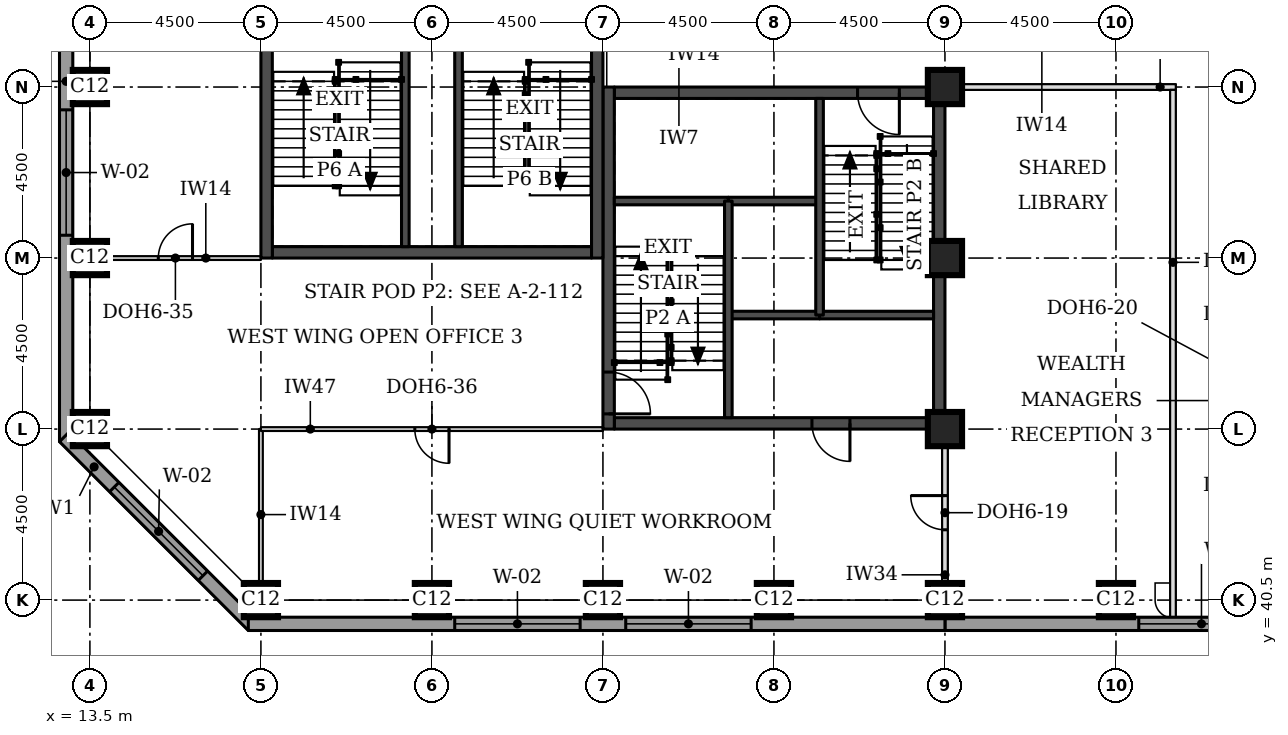
"""IFC4 building model, lengths in metres.
Left out: names, types, materials, properties, quantities, classifications, styles, units other than length and angle.
Written with IfcOpenShell. Run it as: python <this file> out.ifc"""

import sys

from ifc_helpers import new_model, si_unit, direction, frame, frame_2d, origin, origin_2d, place, context, subcontext, project, spatial, rectangle, extrude, element, fill, save


model = new_model("IFC4")
c1 = context("Model", 3, precision=1e-05, world=origin(), true_north=direction((0.0, 1.0)))
c2 = subcontext(c1, "Body", "Model", "MODEL_VIEW")
j1 = project(units=[si_unit("LENGTHUNIT", "METRE"), si_unit("PLANEANGLEUNIT", "RADIAN")], contexts=[c1])
p1 = place(None, origin())
s1 = spatial("IfcSite", under=j1, at=p1, CompositionType="ELEMENT")
p2 = place(p1, origin())
s2 = spatial("IfcBuilding", under=s1, at=p2, CompositionType="ELEMENT")
p3 = place(p2, frame((0.0, 0.0, 188.4)))
s3 = spatial("IfcBuildingStorey", under=s2, at=p3, CompositionType="ELEMENT", Elevation=188.4)
for number, where, z_axis, x_axis in (
    (1, (18.0, 40.5, 0.0), (0.0, 0.0, 1.0), (1.0, 0.0, 0.0)),
    (2, (22.5, 40.5, 0.0), (0.0, 0.0, 1.0), (1.0, 0.0, 0.0)),
    (3, (27.0, 40.5, 0.0), (0.0, 0.0, 1.0), (1.0, 0.0, 0.0)),
    (4, (31.5, 40.5, 0.0), (0.0, 0.0, 1.0), (1.0, 0.0, 0.0)),
    (5, (36.0, 40.5, 0.0), (0.0, 0.0, 1.0), (1.0, 0.0, 0.0)),
    (6, (40.5, 40.5, 0.0), (0.0, 0.0, 1.0), (1.0, 0.0, 0.0)),
    (7, (13.5, 45.0, 0.0), (0.0, 0.0, 1.0), (1.0, 0.0, 0.0)),
    (8, (36.0, 45.0, 0.0), (0.0, 0.0, 1.0), (1.0, 0.0, 0.0)),
    (9, (13.5, 49.5, 0.0), (0.0, 0.0, 1.0), (1.0, 0.0, 0.0)),
    (10, (36.0, 49.5, 0.0), (0.0, 0.0, 1.0), (1.0, 0.0, 0.0)),
    (11, (13.5, 54.0, 0.0), (0.0, 0.0, 1.0), (1.0, 0.0, 0.0)),
    (12, (36.0, 54.0, 0.0), (0.0, 0.0, 1.0), (1.0, 0.0, 0.0)),
):
    element("IfcColumn", number, at=place(p3, frame(where, z_axis=z_axis, x_axis=x_axis)), inside=s3, PredefinedType="COLUMN", context=c2, shape_type="SweptSolid", body=[
        extrude(rectangle(XDim=0.9, YDim=0.9, at=origin_2d()), origin(), (0.0, 0.0, 1.0), 3.7),
    ])
p4 = place(p3, frame((27.3, 45.15, 0.0), z_axis=(0.0, 0.0, 1.0), x_axis=(1.0, 0.0, 0.0)))
e13 = element("IfcWall", 13, at=p4, inside=s3, PredefinedType="SHEAR", context=c2, shape_type="SweptSolid", body=[
    extrude(rectangle(XDim=8.4, YDim=0.3, at=frame_2d((4.2, 0.0))), origin(), (0.0, 0.0, 1.0), 3.7),
])
p5 = place(p4, frame((5.2, 0.0, 0.0)))
e14 = element("IfcOpeningElement", 14, at=p5, cuts=e13, PredefinedType="OPENING", context=c2, shape_type="SweptSolid", body=[
    extrude(rectangle(XDim=1.0, YDim=2.1, at=frame_2d((0.5, 1.05))), frame((0.0, 0.16, 0.0), z_axis=(0.0, -1.0, 0.0), x_axis=(1.0, 0.0, 0.0)), (0.0, 0.0, 1.0), 0.32),
])
p6 = place(p3, frame((27.3, 53.85, 0.0), z_axis=(0.0, 0.0, 1.0), x_axis=(1.0, 0.0, 0.0)))
e15 = element("IfcWall", 15, at=p6, inside=s3, PredefinedType="SHEAR", context=c2, shape_type="SweptSolid", body=[
    extrude(rectangle(XDim=8.4, YDim=0.3, at=frame_2d((4.2, 0.0))), origin(), (0.0, 0.0, 1.0), 3.7),
])
p7 = place(p6, frame((6.4, 0.0, 0.0)))
e16 = element("IfcOpeningElement", 16, at=p7, cuts=e15, PredefinedType="OPENING", context=c2, shape_type="SweptSolid", body=[
    extrude(rectangle(XDim=1.1, YDim=2.1, at=frame_2d((0.55, 1.05))), frame((0.0, 0.16, 0.0), z_axis=(0.0, -1.0, 0.0), x_axis=(1.0, 0.0, 0.0)), (0.0, 0.0, 1.0), 0.32),
])
p8 = place(p3, frame((27.15, 45.0, 0.0), z_axis=(0.0, 0.0, 1.0), x_axis=(0.0, 1.0, 0.0)))
e17 = element("IfcWall", 17, at=p8, inside=s3, PredefinedType="SHEAR", context=c2, shape_type="SweptSolid", body=[
    extrude(rectangle(XDim=9.0, YDim=0.3, at=frame_2d((4.5, 0.0))), origin(), (0.0, 0.0, 1.0), 3.7),
])
p9 = place(p8, frame((0.4, 0.0, 0.0)))
e18 = element("IfcOpeningElement", 18, at=p9, cuts=e17, PredefinedType="OPENING", context=c2, shape_type="SweptSolid", body=[
    extrude(rectangle(XDim=1.1, YDim=2.1, at=frame_2d((0.55, 1.05))), frame((0.0, 0.16, 0.0), z_axis=(0.0, -1.0, 0.0), x_axis=(1.0, 0.0, 0.0)), (0.0, 0.0, 1.0), 0.32),
])
p10 = place(p3, frame((35.85, 45.0, 0.0), z_axis=(0.0, 0.0, 1.0), x_axis=(0.0, 1.0, 0.0)))
e19 = element("IfcWall", 19, at=p10, inside=s3, PredefinedType="SHEAR", context=c2, shape_type="SweptSolid", body=[
    extrude(rectangle(XDim=9.0, YDim=0.3, at=frame_2d((4.5, 0.0))), origin(), (0.0, 0.0, 1.0), 3.7),
])
p11 = place(p3, frame((18.3, 49.65, 0.0), z_axis=(0.0, 0.0, 1.0), x_axis=(1.0, 0.0, 0.0)))
e20 = element("IfcWall", 20, at=p11, inside=s3, PredefinedType="SHEAR", context=c2, shape_type="SweptSolid", body=[
    extrude(rectangle(XDim=8.4, YDim=0.3, at=frame_2d((4.2, 0.0))), origin(), (0.0, 0.0, 1.0), 3.7),
])
p12 = place(p3, frame((18.15, 49.5, 0.0), z_axis=(0.0, 0.0, 1.0), x_axis=(0.0, 1.0, 0.0)))
e21 = element("IfcWall", 21, at=p12, inside=s3, PredefinedType="SHEAR", context=c2, shape_type="SweptSolid", body=[
    extrude(rectangle(XDim=9.0, YDim=0.3, at=frame_2d((4.5, 0.0))), origin(), (0.0, 0.0, 1.0), 3.7),
])
p13 = place(p3, frame((26.85, 49.5, 0.0), z_axis=(0.0, 0.0, 1.0), x_axis=(0.0, 1.0, 0.0)))
e22 = element("IfcWall", 22, at=p13, inside=s3, PredefinedType="SHEAR", context=c2, shape_type="SweptSolid", body=[
    extrude(rectangle(XDim=9.0, YDim=0.3, at=frame_2d((4.5, 0.0))), origin(), (0.0, 0.0, 1.0), 3.7),
])
p14 = place(p13, frame((6.6, 0.0, 0.0)))
e23 = element("IfcOpeningElement", 23, at=p14, cuts=e22, PredefinedType="OPENING", context=c2, shape_type="SweptSolid", body=[
    extrude(rectangle(XDim=1.8, YDim=2.1, at=frame_2d((0.9, 1.05))), frame((0.0, 0.16, 0.0), z_axis=(0.0, -1.0, 0.0), x_axis=(1.0, 0.0, 0.0)), (0.0, 0.0, 1.0), 0.32),
])
p15 = place(p3, frame((36.0, 39.875, 0.0), z_axis=(0.0, 0.0, 1.0), x_axis=(1.0, 0.0, 0.0)))
e24 = element("IfcWall", 24, at=p15, inside=s3, PredefinedType="STANDARD", context=c2, shape_type="SweptSolid", body=[
    extrude(rectangle(XDim=36.331, YDim=0.35, at=frame_2d((18.166, 0.0))), origin(), (0.0, 0.0, 1.0), 3.525),
])
p16 = place(p15, frame((5.1, 0.0, 0.9)))
e25 = element("IfcOpeningElement", 25, at=p16, cuts=e24, PredefinedType="OPENING", context=c2, shape_type="SweptSolid", body=[
    extrude(rectangle(XDim=3.3, YDim=1.9, at=frame_2d((1.65, 0.95))), frame((0.0, 0.185, 0.0), z_axis=(0.0, -1.0, 0.0), x_axis=(1.0, 0.0, 0.0)), (0.0, 0.0, 1.0), 0.37),
])
p17 = place(p15, frame((9.6, 0.0, 0.9)))
e26 = element("IfcOpeningElement", 26, at=p17, cuts=e24, PredefinedType="OPENING", context=c2, shape_type="SweptSolid", body=[
    extrude(rectangle(XDim=3.3, YDim=1.9, at=frame_2d((1.65, 0.95))), frame((0.0, 0.185, 0.0), z_axis=(0.0, -1.0, 0.0), x_axis=(1.0, 0.0, 0.0)), (0.0, 0.0, 1.0), 0.37),
])
p18 = place(p15, frame((14.1, 0.0, 0.9)))
e27 = element("IfcOpeningElement", 27, at=p18, cuts=e24, PredefinedType="OPENING", context=c2, shape_type="SweptSolid", body=[
    extrude(rectangle(XDim=3.3, YDim=1.9, at=frame_2d((1.65, 0.95))), frame((0.0, 0.185, 0.0), z_axis=(0.0, -1.0, 0.0), x_axis=(1.0, 0.0, 0.0)), (0.0, 0.0, 1.0), 0.37),
])
p19 = place(p15, frame((18.6, 0.0, 0.9)))
e28 = element("IfcOpeningElement", 28, at=p19, cuts=e24, PredefinedType="OPENING", context=c2, shape_type="SweptSolid", body=[
    extrude(rectangle(XDim=3.3, YDim=1.9, at=frame_2d((1.65, 0.95))), frame((0.0, 0.185, 0.0), z_axis=(0.0, -1.0, 0.0), x_axis=(1.0, 0.0, 0.0)), (0.0, 0.0, 1.0), 0.37),
])
p20 = place(p15, frame((23.1, 0.0, 0.9)))
e29 = element("IfcOpeningElement", 29, at=p20, cuts=e24, PredefinedType="OPENING", context=c2, shape_type="SweptSolid", body=[
    extrude(rectangle(XDim=3.3, YDim=1.9, at=frame_2d((1.65, 0.95))), frame((0.0, 0.185, 0.0), z_axis=(0.0, -1.0, 0.0), x_axis=(1.0, 0.0, 0.0)), (0.0, 0.0, 1.0), 0.37),
])
p21 = place(p15, frame((27.6, 0.0, 0.9)))
e30 = element("IfcOpeningElement", 30, at=p21, cuts=e24, PredefinedType="OPENING", context=c2, shape_type="SweptSolid", body=[
    extrude(rectangle(XDim=3.3, YDim=1.9, at=frame_2d((1.65, 0.95))), frame((0.0, 0.185, 0.0), z_axis=(0.0, -1.0, 0.0), x_axis=(1.0, 0.0, 0.0)), (0.0, 0.0, 1.0), 0.37),
])
p22 = place(p3, frame((12.875, 58.831, 0.0), z_axis=(0.0, 0.0, 1.0), x_axis=(0.0, -1.0, 0.0)))
e31 = element("IfcWall", 31, at=p22, inside=s3, PredefinedType="STANDARD", context=c2, shape_type="SweptSolid", body=[
    extrude(rectangle(XDim=14.163, YDim=0.35, at=frame_2d((7.081, 0.0))), origin(), (0.0, 0.0, 1.0), 3.525),
])
p23 = place(p22, frame((5.431, 0.0, 0.9)))
e32 = element("IfcOpeningElement", 32, at=p23, cuts=e31, PredefinedType="OPENING", context=c2, shape_type="SweptSolid", body=[
    extrude(rectangle(XDim=3.3, YDim=1.9, at=frame_2d((1.65, 0.95))), frame((0.0, 0.185, 0.0), z_axis=(0.0, -1.0, 0.0), x_axis=(1.0, 0.0, 0.0)), (0.0, 0.0, 1.0), 0.37),
])
p24 = place(p3, frame((12.824, 44.792, 0.0), z_axis=(0.0, 0.0, 1.0), x_axis=(0.707106781187, -0.707106781187, 0.0)))
e33 = element("IfcWall", 33, at=p24, inside=s3, PredefinedType="STANDARD", context=c2, shape_type="SweptSolid", body=[
    extrude(rectangle(XDim=7.027, YDim=0.35, at=frame_2d((3.513, 0.0))), origin(), (0.0, 0.0, 1.0), 3.525),
])
p25 = place(p24, frame((1.863, 0.0, 0.9)))
e34 = element("IfcOpeningElement", 34, at=p25, cuts=e33, PredefinedType="OPENING", context=c2, shape_type="SweptSolid", body=[
    extrude(rectangle(XDim=3.3, YDim=1.9, at=frame_2d((1.65, 0.95))), frame((0.0, 0.185, 0.0), z_axis=(0.0, -1.0, 0.0), x_axis=(1.0, 0.0, 0.0)), (0.0, 0.0, 1.0), 0.37),
])
p26 = place(p3, frame((17.669, 39.875, 0.0), z_axis=(0.0, 0.0, 1.0), x_axis=(1.0, 0.0, 0.0)))
e35 = element("IfcWall", 35, at=p26, inside=s3, PredefinedType="STANDARD", context=c2, shape_type="SweptSolid", body=[
    extrude(rectangle(XDim=18.331, YDim=0.35, at=frame_2d((9.166, 0.0))), origin(), (0.0, 0.0, 1.0), 3.525),
])
p27 = place(p26, frame((5.431, 0.0, 0.9)))
e36 = element("IfcOpeningElement", 36, at=p27, cuts=e35, PredefinedType="OPENING", context=c2, shape_type="SweptSolid", body=[
    extrude(rectangle(XDim=3.3, YDim=1.9, at=frame_2d((1.65, 0.95))), frame((0.0, 0.185, 0.0), z_axis=(0.0, -1.0, 0.0), x_axis=(1.0, 0.0, 0.0)), (0.0, 0.0, 1.0), 0.37),
])
p28 = place(p26, frame((9.931, 0.0, 0.9)))
e37 = element("IfcOpeningElement", 37, at=p28, cuts=e35, PredefinedType="OPENING", context=c2, shape_type="SweptSolid", body=[
    extrude(rectangle(XDim=3.3, YDim=1.9, at=frame_2d((1.65, 0.95))), frame((0.0, 0.185, 0.0), z_axis=(0.0, -1.0, 0.0), x_axis=(1.0, 0.0, 0.0)), (0.0, 0.0, 1.0), 0.37),
])
p29 = place(p3, frame((36.45, 54.0, 0.0), z_axis=(0.0, 0.0, 1.0), x_axis=(1.0, 0.0, 0.0)))
e38 = element("IfcWall", 38, at=p29, inside=s3, PredefinedType="PARTITIONING", context=c2, shape_type="SweptSolid", body=[
    extrude(rectangle(XDim=5.625, YDim=0.15, at=frame_2d((2.812, 0.0))), origin(), (0.0, 0.0, 1.0), 3.55),
])
p30 = place(p3, frame((42.0, 40.05, 0.0), z_axis=(0.0, 0.0, 1.0), x_axis=(0.0, 1.0, 0.0)))
e39 = element("IfcWall", 39, at=p30, inside=s3, PredefinedType="PARTITIONING", context=c2, shape_type="SweptSolid", body=[
    extrude(rectangle(XDim=13.875, YDim=0.15, at=frame_2d((6.938, 0.0))), origin(), (0.0, 0.0, 1.0), 3.55),
])
p31 = place(p3, frame((36.0, 40.95, 0.0), z_axis=(0.0, 0.0, 1.0), x_axis=(0.0, 1.0, 0.0)))
e40 = element("IfcWall", 40, at=p31, inside=s3, PredefinedType="PARTITIONING", context=c2, shape_type="SweptSolid", body=[
    extrude(rectangle(XDim=3.63, YDim=0.15, at=frame_2d((1.815, 0.0))), origin(), (0.0, 0.0, 1.0), 2.8),
])
p32 = place(p31, frame((1.4, 0.0, 0.0)))
e41 = element("IfcOpeningElement", 41, at=p32, cuts=e40, PredefinedType="OPENING", context=c2, shape_type="SweptSolid", body=[
    extrude(rectangle(XDim=0.9, YDim=2.1, at=frame_2d((0.45, 1.05))), frame((0.0, 0.085, 0.0), z_axis=(0.0, -1.0, 0.0), x_axis=(1.0, 0.0, 0.0)), (0.0, 0.0, 1.0), 0.17),
])
p33 = place(p3, frame((13.5, 49.5, 0.0), z_axis=(0.0, 0.0, 1.0), x_axis=(1.0, 0.0, 0.0)))
e42 = element("IfcWall", 42, at=p33, inside=s3, PredefinedType="PARTITIONING", context=c2, shape_type="SweptSolid", body=[
    extrude(rectangle(XDim=4.5, YDim=0.1, at=frame_2d((2.25, 0.0))), origin(), (0.0, 0.0, 1.0), 3.55),
])
p34 = place(p33, frame((1.8, 0.0, 0.0)))
e43 = element("IfcOpeningElement", 43, at=p34, cuts=e42, PredefinedType="OPENING", context=c2, shape_type="SweptSolid", body=[
    extrude(rectangle(XDim=0.9, YDim=2.1, at=frame_2d((0.45, 1.05))), frame((0.0, 0.06, 0.0), z_axis=(0.0, -1.0, 0.0), x_axis=(1.0, 0.0, 0.0)), (0.0, 0.0, 1.0), 0.12),
])
p35 = place(p3, frame((18.0, 40.5, 0.0), z_axis=(0.0, 0.0, 1.0), x_axis=(0.0, 1.0, 0.0)))
e44 = element("IfcWall", 44, at=p35, inside=s3, PredefinedType="PARTITIONING", context=c2, shape_type="SweptSolid", body=[
    extrude(rectangle(XDim=4.5, YDim=0.1, at=frame_2d((2.25, 0.0))), origin(), (0.0, 0.0, 1.0), 3.55),
])
p36 = place(p3, frame((18.0, 45.0, 0.0), z_axis=(0.0, 0.0, 1.0), x_axis=(1.0, 0.0, 0.0)))
e45 = element("IfcWall", 45, at=p36, inside=s3, PredefinedType="PARTITIONING", context=c2, shape_type="SweptSolid", body=[
    extrude(rectangle(XDim=9.0, YDim=0.1, at=frame_2d((4.5, 0.0))), origin(), (0.0, 0.0, 1.0), 2.55),
])
p37 = place(p36, frame((4.05, 0.0, 0.0)))
e46 = element("IfcOpeningElement", 46, at=p37, cuts=e45, PredefinedType="OPENING", context=c2, shape_type="SweptSolid", body=[
    extrude(rectangle(XDim=0.9, YDim=2.1, at=frame_2d((0.45, 1.05))), frame((0.0, 0.06, 0.0), z_axis=(0.0, -1.0, 0.0), x_axis=(1.0, 0.0, 0.0)), (0.0, 0.0, 1.0), 0.12),
])
p38 = place(p3, frame((30.3, 48.0, 0.0), z_axis=(0.0, 0.0, 1.0), x_axis=(1.0, 0.0, 0.0)))
e47 = element("IfcWall", 47, at=p38, inside=s3, PredefinedType="SOLIDWALL", context=c2, shape_type="SweptSolid", body=[
    extrude(rectangle(XDim=2.4, YDim=0.2, at=frame_2d((1.2, 0.0))), origin(), (0.0, 0.0, 1.0), 3.55),
])
p39 = place(p3, frame((32.7, 48.0, 0.0), z_axis=(0.0, 0.0, 1.0), x_axis=(1.0, 0.0, 0.0)))
e48 = element("IfcWall", 48, at=p39, inside=s3, PredefinedType="SOLIDWALL", context=c2, shape_type="SweptSolid", body=[
    extrude(rectangle(XDim=3.0, YDim=0.2, at=frame_2d((1.5, 0.0))), origin(), (0.0, 0.0, 1.0), 3.55),
])
p40 = place(p3, frame((30.3, 51.0, 0.0), z_axis=(0.0, 0.0, 1.0), x_axis=(1.0, 0.0, 0.0)))
e49 = element("IfcWall", 49, at=p40, inside=s3, PredefinedType="SOLIDWALL", context=c2, shape_type="SweptSolid", body=[
    extrude(rectangle(XDim=2.4, YDim=0.2, at=frame_2d((1.2, 0.0))), origin(), (0.0, 0.0, 1.0), 3.7),
])
p41 = place(p3, frame((27.3, 51.0, 0.0), z_axis=(0.0, 0.0, 1.0), x_axis=(1.0, 0.0, 0.0)))
e50 = element("IfcWall", 50, at=p41, inside=s3, PredefinedType="SOLIDWALL", context=c2, shape_type="SweptSolid", body=[
    extrude(rectangle(XDim=3.0, YDim=0.2, at=frame_2d((1.5, 0.0))), origin(), (0.0, 0.0, 1.0), 3.55),
])
for number, where, z_axis, x_axis in (
    (51, (30.3, 45.3, 0.0), (0.0, 0.0, 1.0), (0.0, 1.0, 0.0)),
    (52, (32.7, 48.0, 0.0), (0.0, 0.0, 1.0), (0.0, 1.0, 0.0)),
):
    element("IfcWall", number, at=place(p3, frame(where, z_axis=z_axis, x_axis=x_axis)), inside=s3, PredefinedType="SOLIDWALL", context=c2, shape_type="SweptSolid", body=[
        extrude(rectangle(XDim=5.7, YDim=0.2, at=frame_2d((2.85, 0.0))), origin(), (0.0, 0.0, 1.0), 3.55),
    ])
for number, where, z_axis, x_axis in (
    (53, (21.8, 49.8, 0.0), (0.0, 0.0, 1.0), (0.0, 1.0, 0.0)),
    (54, (23.2, 49.8, 0.0), (0.0, 0.0, 1.0), (0.0, 1.0, 0.0)),
):
    element("IfcWall", number, at=place(p3, frame(where, z_axis=z_axis, x_axis=x_axis)), inside=s3, PredefinedType="SOLIDWALL", context=c2, shape_type="SweptSolid", body=[
        extrude(rectangle(XDim=6.05, YDim=0.2, at=frame_2d((3.025, 0.0))), origin(), (0.0, 0.0, 1.0), 3.55),
    ])
p42 = place(p16, origin())
e55 = element("IfcWindow", 55, at=p42, inside=s3, PartitioningType="SINGLE_PANEL", PredefinedType="WINDOW", context=c2, shape_type="SweptSolid", body=[
    extrude(rectangle(XDim=3.3, YDim=1.9, at=frame_2d((1.65, 0.95))), frame((0.0, 0.085, 0.0), z_axis=(0.0, -1.0, 0.0), x_axis=(1.0, 0.0, 0.0)), (0.0, 0.0, 1.0), 0.06),
])
fill(e25, e55)
p43 = place(p23, origin())
e56 = element("IfcWindow", 56, at=p43, inside=s3, PartitioningType="SINGLE_PANEL", PredefinedType="WINDOW", context=c2, shape_type="SweptSolid", body=[
    extrude(rectangle(XDim=3.3, YDim=1.9, at=frame_2d((1.65, 0.95))), frame((0.0, 0.085, 0.0), z_axis=(0.0, -1.0, 0.0), x_axis=(1.0, 0.0, 0.0)), (0.0, 0.0, 1.0), 0.06),
])
fill(e32, e56)
p44 = place(p25, origin())
e57 = element("IfcWindow", 57, at=p44, inside=s3, PartitioningType="SINGLE_PANEL", PredefinedType="WINDOW", context=c2, shape_type="SweptSolid", body=[
    extrude(rectangle(XDim=3.3, YDim=1.9, at=frame_2d((1.65, 0.95))), frame((0.0, 0.085, 0.0), z_axis=(0.0, -1.0, 0.0), x_axis=(1.0, 0.0, 0.0)), (0.0, 0.0, 1.0), 0.06),
])
fill(e34, e57)
p45 = place(p27, origin())
e58 = element("IfcWindow", 58, at=p45, inside=s3, PartitioningType="SINGLE_PANEL", PredefinedType="WINDOW", context=c2, shape_type="SweptSolid", body=[
    extrude(rectangle(XDim=3.3, YDim=1.9, at=frame_2d((1.65, 0.95))), frame((0.0, 0.085, 0.0), z_axis=(0.0, -1.0, 0.0), x_axis=(1.0, 0.0, 0.0)), (0.0, 0.0, 1.0), 0.06),
])
fill(e36, e58)
p46 = place(p28, origin())
e59 = element("IfcWindow", 59, at=p46, inside=s3, PartitioningType="SINGLE_PANEL", PredefinedType="WINDOW", context=c2, shape_type="SweptSolid", body=[
    extrude(rectangle(XDim=3.3, YDim=1.9, at=frame_2d((1.65, 0.95))), frame((0.0, 0.085, 0.0), z_axis=(0.0, -1.0, 0.0), x_axis=(1.0, 0.0, 0.0)), (0.0, 0.0, 1.0), 0.06),
])
fill(e37, e59)
p47 = place(p32, origin())
e60 = element("IfcDoor", 60, at=p47, inside=s3, OperationType="SINGLE_SWING_RIGHT", PredefinedType="DOOR", context=c2, shape_type="SweptSolid", body=[
    extrude(rectangle(XDim=0.9, YDim=2.1, at=frame_2d((0.45, 1.05))), frame((0.0, 0.025, 0.0), z_axis=(0.0, -1.0, 0.0), x_axis=(1.0, 0.0, 0.0)), (0.0, 0.0, 1.0), 0.05),
])
fill(e41, e60)
p48 = place(p34, origin())
e61 = element("IfcDoor", 61, at=p48, inside=s3, OperationType="SINGLE_SWING_RIGHT", PredefinedType="DOOR", context=c2, shape_type="SweptSolid", body=[
    extrude(rectangle(XDim=0.9, YDim=2.1, at=frame_2d((0.45, 1.05))), frame((0.0, 0.025, 0.0), z_axis=(0.0, -1.0, 0.0), x_axis=(1.0, 0.0, 0.0)), (0.0, 0.0, 1.0), 0.05),
])
fill(e43, e61)
p49 = place(p37, frame((0.9, 0.0, 0.0), z_axis=(0.0, 0.0, 1.0), x_axis=(-1.0, 0.0, 0.0)))
e62 = element("IfcDoor", 62, at=p49, inside=s3, OperationType="SINGLE_SWING_LEFT", PredefinedType="DOOR", context=c2, shape_type="SweptSolid", body=[
    extrude(rectangle(XDim=0.9, YDim=2.1, at=frame_2d((0.45, 1.05))), frame((0.0, 0.025, 0.0), z_axis=(0.0, -1.0, 0.0), x_axis=(1.0, 0.0, 0.0)), (0.0, 0.0, 1.0), 0.05),
])
fill(e46, e62)
p50 = place(p9, frame((1.1, 0.0, 0.0), z_axis=(0.0, 0.0, 1.0), x_axis=(-1.0, 0.0, 0.0)))
e63 = element("IfcDoor", 63, at=p50, inside=s3, OperationType="SINGLE_SWING_RIGHT", PredefinedType="DOOR", context=c2, shape_type="SweptSolid", body=[
    extrude(rectangle(XDim=1.1, YDim=2.1, at=frame_2d((0.55, 1.05))), frame((0.0, 0.025, 0.0), z_axis=(0.0, -1.0, 0.0), x_axis=(1.0, 0.0, 0.0)), (0.0, 0.0, 1.0), 0.05),
])
fill(e18, e63)
p51 = place(p7, frame((1.1, 0.0, 0.0), z_axis=(0.0, 0.0, 1.0), x_axis=(-1.0, 0.0, 0.0)))
e64 = element("IfcDoor", 64, at=p51, inside=s3, OperationType="SINGLE_SWING_LEFT", PredefinedType="DOOR", context=c2, shape_type="SweptSolid", body=[
    extrude(rectangle(XDim=1.1, YDim=2.1, at=frame_2d((0.55, 1.05))), frame((0.0, 0.025, 0.0), z_axis=(0.0, -1.0, 0.0), x_axis=(1.0, 0.0, 0.0)), (0.0, 0.0, 1.0), 0.05),
])
fill(e16, e64)
p52 = place(p5, frame((1.0, 0.0, 0.0), z_axis=(0.0, 0.0, 1.0), x_axis=(-1.0, 0.0, 0.0)))
e65 = element("IfcDoor", 65, at=p52, inside=s3, OperationType="SINGLE_SWING_LEFT", PredefinedType="DOOR", context=c2, shape_type="SweptSolid", body=[
    extrude(rectangle(XDim=1.0, YDim=2.1, at=frame_2d((0.5, 1.05))), frame((0.0, 0.025, 0.0), z_axis=(0.0, -1.0, 0.0), x_axis=(1.0, 0.0, 0.0)), (0.0, 0.0, 1.0), 0.05),
])
fill(e14, e65)
save(model, sys.argv[1])
